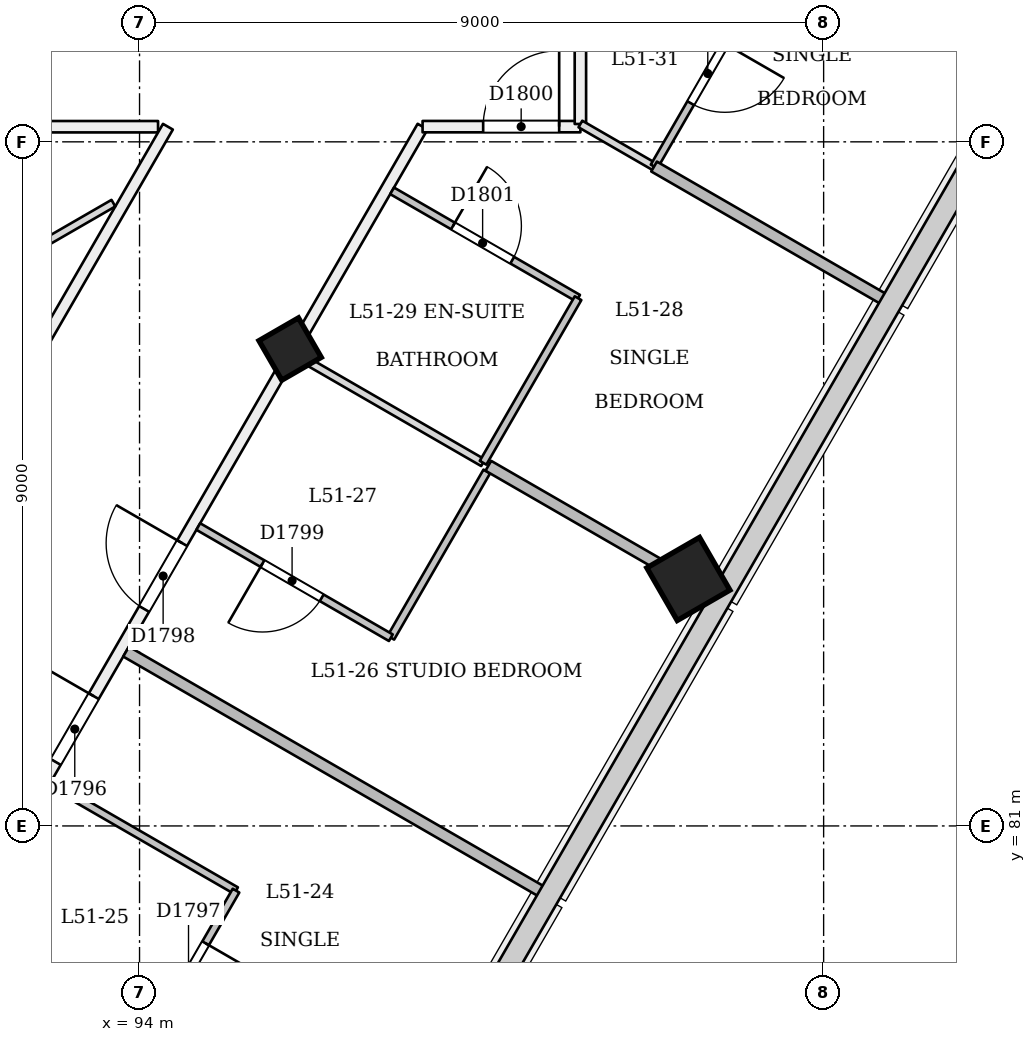
"""IFC4 building model, lengths in metres.
Left out: names, types, materials, properties, quantities, classifications, styles, units other than length and angle.
Written with IfcOpenShell. Run it as: python <this file> out.ifc"""

import sys

from ifc_helpers import new_model, si_unit, direction, frame, frame_2d, origin, origin_2d, place, context, subcontext, project, spatial, rectangle, extrude, element, fill, save


model = new_model("IFC4")
c1 = context("Model", 3, precision=1e-05, world=origin(), true_north=direction((0.0, 1.0)))
c2 = subcontext(c1, "Body", "Model", "MODEL_VIEW")
j1 = project(units=[si_unit("LENGTHUNIT", "METRE"), si_unit("PLANEANGLEUNIT", "RADIAN")], contexts=[c1])
p1 = place(None, origin())
s1 = spatial("IfcSite", under=j1, at=p1, CompositionType="ELEMENT")
p2 = place(p1, origin())
s2 = spatial("IfcBuilding", under=s1, at=p2, CompositionType="ELEMENT")
p3 = place(p2, frame((0.0, 0.0, 198.0)))
s3 = spatial("IfcBuildingStorey", under=s2, at=p3, CompositionType="ELEMENT", Elevation=198.0)
p4 = place(p3, frame((96.008, 87.227, -0.018), z_axis=(-0.02222134892, 0.038480872521, 0.999012229206), x_axis=(-0.500169939593, -0.865642180581, 0.022218162104)))
e1 = element("IfcColumn", 1, at=p4, inside=s3, PredefinedType="COLUMN", context=c2, shape_type="SweptSolid", body=[
    extrude(rectangle(XDim=0.6, YDim=0.6, at=origin_2d()), origin(), (0.0, 0.0, 1.0), 3.604),
])
p5 = place(p3, frame((101.248, 84.202, -0.024), z_axis=(-0.02215519141, 0.038415882353, 0.999016199807), x_axis=(-0.50065279292, -0.865364153162, 0.02217348332)))
e2 = element("IfcColumn", 2, at=p5, inside=s3, PredefinedType="COLUMN", context=c2, shape_type="SweptSolid", body=[
    extrude(rectangle(XDim=0.8, YDim=0.8, at=origin_2d()), origin(), (0.0, 0.0, 1.0), 3.604),
])
p6 = place(p3, frame((88.0, 90.199, 0.0), z_axis=(0.0, 0.0, 1.0), x_axis=(1.0, 0.0, 0.0)))
e3 = element("IfcWall", 3, at=p6, inside=s3, PredefinedType="PARTITIONING", context=c2, shape_type="SweptSolid", body=[
    extrude(rectangle(XDim=6.243, YDim=0.15, at=frame_2d((3.122, 0.0))), origin(), (0.0, 0.0, 1.0), 3.15),
])
p7 = place(p6, frame((1.845, 0.0, 0.0)))
e4 = element("IfcOpeningElement", 4, at=p7, cuts=e3, PredefinedType="OPENING", context=c2, shape_type="SweptSolid", body=[
    extrude(rectangle(XDim=1.0, YDim=2.1, at=frame_2d((0.5, 1.05))), frame((0.0, 0.085, 0.0), z_axis=(0.0, -1.0, 0.0), x_axis=(1.0, 0.0, 0.0)), (0.0, 0.0, 1.0), 0.171),
])
p8 = place(p3, frame((85.758, 69.475, 0.0), z_axis=(0.0, 0.0, 1.0), x_axis=(0.500001211172, 0.866024704513, 0.0)))
e5 = element("IfcWall", 5, at=p8, inside=s3, PredefinedType="PARTITIONING", context=c2, shape_type="SweptSolid", body=[
    extrude(rectangle(XDim=23.932, YDim=0.15, at=frame_2d((11.966, 0.0))), origin(), (0.0, 0.0, 1.0), 2.75),
])
p9 = place(p8, frame((5.395, 0.0, 0.0)))
e6 = element("IfcOpeningElement", 6, at=p9, cuts=e5, PredefinedType="OPENING", context=c2, shape_type="SweptSolid", body=[
    extrude(rectangle(XDim=1.0, YDim=2.1, at=frame_2d((0.5, 1.05))), frame((0.0, 0.085, 0.0), z_axis=(0.0, -1.0, 0.0), x_axis=(1.0, 0.0, 0.0)), (0.0, 0.0, 1.0), 0.171),
])
p10 = place(p8, frame((7.72, 0.0, 0.0)))
e7 = element("IfcOpeningElement", 7, at=p10, cuts=e5, PredefinedType="OPENING", context=c2, shape_type="SweptSolid", body=[
    extrude(rectangle(XDim=1.0, YDim=2.1, at=frame_2d((0.5, 1.05))), frame((0.0, 0.085, 0.0), z_axis=(0.0, -1.0, 0.0), x_axis=(1.0, 0.0, 0.0)), (0.0, 0.0, 1.0), 0.171),
])
p11 = place(p8, frame((14.28, 0.0, 0.0)))
e8 = element("IfcOpeningElement", 8, at=p11, cuts=e5, PredefinedType="OPENING", context=c2, shape_type="SweptSolid", body=[
    extrude(rectangle(XDim=1.0, YDim=2.1, at=frame_2d((0.5, 1.05))), frame((0.0, 0.085, 0.0), z_axis=(0.0, -1.0, 0.0), x_axis=(1.0, 0.0, 0.0)), (0.0, 0.0, 1.0), 0.171),
])
p12 = place(p8, frame((16.605, 0.0, 0.0)))
e9 = element("IfcOpeningElement", 9, at=p12, cuts=e5, PredefinedType="OPENING", context=c2, shape_type="SweptSolid", body=[
    extrude(rectangle(XDim=1.0, YDim=2.1, at=frame_2d((0.5, 1.05))), frame((0.0, 0.085, 0.0), z_axis=(0.0, -1.0, 0.0), x_axis=(1.0, 0.0, 0.0)), (0.0, 0.0, 1.0), 0.171),
])
p13 = place(p3, frame((97.724, 90.2, 0.0), z_axis=(0.0, 0.0, 1.0), x_axis=(1.0, 0.0, 0.0)))
e10 = element("IfcWall", 10, at=p13, inside=s3, PredefinedType="PARTITIONING", context=c2, shape_type="SweptSolid", body=[
    extrude(rectangle(XDim=2.076, YDim=0.15, at=frame_2d((1.038, 0.0))), origin(), (0.0, 0.0, 1.0), 3.15),
])
p14 = place(p13, frame((0.797, 0.0, 0.0)))
e11 = element("IfcOpeningElement", 11, at=p14, cuts=e10, PredefinedType="OPENING", context=c2, shape_type="SweptSolid", body=[
    extrude(rectangle(XDim=1.0, YDim=2.1, at=frame_2d((0.5, 1.05))), frame((0.0, 0.085, 0.0), z_axis=(0.0, -1.0, 0.0), x_axis=(1.0, 0.0, 0.0)), (0.0, 0.0, 1.0), 0.171),
])
p15 = place(p3, frame((99.8, 90.235, 0.0), z_axis=(0.0, 0.0, 1.0), x_axis=(0.0, 1.0, 0.0)))
e12 = element("IfcWall", 12, at=p15, inside=s3, PredefinedType="PARTITIONING", context=c2, shape_type="SweptSolid", body=[
    extrude(rectangle(XDim=3.561, YDim=0.15, at=frame_2d((1.781, 0.0))), origin(), (0.0, 0.0, 1.0), 3.15),
])
p16 = place(p3, frame((94.373, 90.199, 0.0), z_axis=(0.0, 0.0, 1.0), x_axis=(-0.499999438619, -0.866025727897, 0.0)))
e13 = element("IfcWall", 13, at=p16, inside=s3, PredefinedType="PARTITIONING", context=c2, shape_type="SweptSolid", body=[
    extrude(rectangle(XDim=18.617, YDim=0.15, at=frame_2d((9.308, 0.0))), origin(), (0.0, 0.0, 1.0), 3.15),
])
p17 = place(p16, frame((5.282, 0.0, 0.0)))
e14 = element("IfcOpeningElement", 14, at=p17, cuts=e13, PredefinedType="OPENING", context=c2, shape_type="SweptSolid", body=[
    extrude(rectangle(XDim=0.9, YDim=2.1, at=frame_2d((0.45, 1.05))), frame((0.0, 0.085, 0.0), z_axis=(0.0, -1.0, 0.0), x_axis=(1.0, 0.0, 0.0)), (0.0, 0.0, 1.0), 0.171),
])
p18 = place(p3, frame((93.656, 89.193, 0.0), z_axis=(0.0, 0.0, 1.0), x_axis=(-0.866016884399, -0.500014755718, 0.0)))
e15 = element("IfcWall", 15, at=p18, inside=s3, PredefinedType="PARTITIONING", context=c2, shape_type="SweptSolid", body=[
    extrude(rectangle(XDim=6.531, YDim=0.1, at=frame_2d((3.266, 0.0))), origin(), (0.0, 0.0, 1.0), 3.15),
])
p19 = place(p3, frame((93.976, 78.009, 0.0), z_axis=(0.0, 0.0, 1.0), x_axis=(-0.866042014628, 0.499971228071, 0.0)))
e16 = element("IfcWall", 16, at=p19, inside=s3, PredefinedType="PARTITIONING", context=c2, shape_type="SweptSolid", body=[
    extrude(rectangle(XDim=2.775, YDim=0.1, at=frame_2d((1.388, 0.0))), origin(), (0.0, 0.0, 1.0), 2.75),
])
p20 = place(p3, frame((92.823, 81.561, 0.0), z_axis=(0.0, 0.0, 1.0), x_axis=(0.866048868473, -0.499959355765, 0.0)))
e17 = element("IfcWall", 17, at=p20, inside=s3, PredefinedType="PARTITIONING", context=c2, shape_type="SweptSolid", body=[
    extrude(rectangle(XDim=2.825, YDim=0.1, at=frame_2d((1.413, 0.0))), origin(), (0.0, 0.0, 1.0), 3.15),
])
p21 = place(p3, frame((95.269, 80.149, 0.0), z_axis=(0.0, 0.0, 1.0), x_axis=(-0.500004234368, -0.866022959057, 0.0)))
e18 = element("IfcWall", 18, at=p21, inside=s3, PredefinedType="PARTITIONING", context=c2, shape_type="SweptSolid", body=[
    extrude(rectangle(XDim=5.0, YDim=0.1, at=frame_2d((2.5, 0.0))), origin(), (0.0, 0.0, 1.0), 2.75),
])
p22 = place(p21, frame((3.3, 0.0, 0.0)))
e19 = element("IfcOpeningElement", 19, at=p22, cuts=e18, PredefinedType="OPENING", context=c2, shape_type="SweptSolid", body=[
    extrude(rectangle(XDim=0.9, YDim=2.1, at=frame_2d((0.45, 1.05))), frame((0.0, 0.061, 0.0), z_axis=(0.0, -1.0, 0.0), x_axis=(1.0, 0.0, 0.0)), (0.0, 0.0, 1.0), 0.121),
])
p23 = place(p21, frame((0.8, 0.0, 0.0)))
e20 = element("IfcOpeningElement", 20, at=p23, cuts=e18, PredefinedType="OPENING", context=c2, shape_type="SweptSolid", body=[
    extrude(rectangle(XDim=0.9, YDim=2.1, at=frame_2d((0.45, 1.05))), frame((0.0, 0.061, 0.0), z_axis=(0.0, -1.0, 0.0), x_axis=(1.0, 0.0, 0.0)), (0.0, 0.0, 1.0), 0.121),
])
p24 = place(p3, frame((99.318, 80.121, 0.0), z_axis=(0.0, 0.0, 1.0), x_axis=(-0.866025401434, 0.500000004071, 0.0)))
e21 = element("IfcWall", 21, at=p24, inside=s3, PredefinedType="PARTITIONING", context=c2, shape_type="SweptSolid", body=[
    extrude(rectangle(XDim=6.345, YDim=0.15, at=frame_2d((3.173, 0.0))), origin(), (0.0, 0.0, 1.0), 2.65),
])
p25 = place(p3, frame((98.568, 85.663, 0.0), z_axis=(0.0, 0.0, 1.0), x_axis=(-0.499976333282, -0.866039067339, 0.0)))
e22 = element("IfcWall", 22, at=p25, inside=s3, PredefinedType="PARTITIONING", context=c2, shape_type="SweptSolid", body=[
    extrude(rectangle(XDim=2.525, YDim=0.1, at=frame_2d((1.262, 0.0))), origin(), (0.0, 0.0, 1.0), 2.75),
])
p26 = place(p3, frame((97.306, 83.476, 0.0), z_axis=(0.0, 0.0, 1.0), x_axis=(-0.86601045545, 0.500025890382, 0.0)))
e23 = element("IfcWall", 23, at=p26, inside=s3, PredefinedType="PARTITIONING", context=c2, shape_type="SweptSolid", body=[
    extrude(rectangle(XDim=2.925, YDim=0.1, at=frame_2d((1.462, 0.0))), origin(), (0.0, 0.0, 1.0), 3.15),
])
p27 = place(p26, frame((1.05, 0.0, 0.0)))
e24 = element("IfcOpeningElement", 24, at=p27, cuts=e23, PredefinedType="OPENING", context=c2, shape_type="SweptSolid", body=[
    extrude(rectangle(XDim=0.9, YDim=2.1, at=frame_2d((0.45, 1.05))), frame((0.0, 0.061, 0.0), z_axis=(0.0, -1.0, 0.0), x_axis=(1.0, 0.0, 0.0)), (0.0, 0.0, 1.0), 0.121),
])
p28 = place(p3, frame((101.551, 84.028, 0.0), z_axis=(0.0, 0.0, 1.0), x_axis=(-0.866038183914, 0.499977863513, 0.0)))
e25 = element("IfcWall", 25, at=p28, inside=s3, PredefinedType="PARTITIONING", context=c2, shape_type="SweptSolid", body=[
    extrude(rectangle(XDim=3.42, YDim=0.15, at=frame_2d((1.71, 0.0))), origin(), (0.0, 0.0, 1.0), 2.65),
])
p29 = place(p3, frame((98.519, 85.778, 0.0), z_axis=(0.0, 0.0, 1.0), x_axis=(-0.866011447264, 0.500024172624, 0.0)))
e26 = element("IfcWall", 26, at=p29, inside=s3, PredefinedType="PARTITIONING", context=c2, shape_type="SweptSolid", body=[
    extrude(rectangle(XDim=2.825, YDim=0.1, at=frame_2d((1.413, 0.0))), origin(), (0.0, 0.0, 1.0), 2.75),
])
p30 = place(p3, frame((97.323, 89.356, 0.0), z_axis=(0.0, 0.0, 1.0), x_axis=(0.866011447264, -0.500024172624, 0.0)))
e27 = element("IfcWall", 27, at=p30, inside=s3, PredefinedType="PARTITIONING", context=c2, shape_type="SweptSolid", body=[
    extrude(rectangle(XDim=2.825, YDim=0.1, at=frame_2d((1.413, 0.0))), origin(), (0.0, 0.0, 1.0), 3.15),
])
p31 = place(p30, frame((0.925, 0.0, 0.0)))
e28 = element("IfcOpeningElement", 28, at=p31, cuts=e27, PredefinedType="OPENING", context=c2, shape_type="SweptSolid", body=[
    extrude(rectangle(XDim=0.9, YDim=2.1, at=frame_2d((0.45, 1.05))), frame((0.0, 0.061, 0.0), z_axis=(0.0, -1.0, 0.0), x_axis=(1.0, 0.0, 0.0)), (0.0, 0.0, 1.0), 0.121),
])
p32 = place(p3, frame((99.769, 87.943, 0.0), z_axis=(0.0, 0.0, 1.0), x_axis=(-0.500004234368, -0.866022959057, 0.0)))
e29 = element("IfcWall", 29, at=p32, inside=s3, PredefinedType="PARTITIONING", context=c2, shape_type="SweptSolid", body=[
    extrude(rectangle(XDim=2.5, YDim=0.1, at=frame_2d((1.25, 0.0))), origin(), (0.0, 0.0, 1.0), 2.75),
])
p33 = place(p3, frame((103.818, 87.915, 0.0), z_axis=(0.0, 0.0, 1.0), x_axis=(-0.866036599697, 0.499980607609, 0.0)))
e30 = element("IfcWall", 30, at=p33, inside=s3, PredefinedType="PARTITIONING", context=c2, shape_type="SweptSolid", body=[
    extrude(rectangle(XDim=3.52, YDim=0.15, at=frame_2d((1.76, 0.0))), origin(), (0.0, 0.0, 1.0), 2.65),
])
p34 = place(p3, frame((100.769, 89.675, 0.0), z_axis=(0.0, 0.0, 1.0), x_axis=(-0.865938551386, 0.500150402602, 0.0)))
e31 = element("IfcWall", 31, at=p34, inside=s3, PredefinedType="PARTITIONING", context=c2, shape_type="SweptSolid", body=[
    extrude(rectangle(XDim=1.119, YDim=0.1, at=frame_2d((0.56, 0.0))), origin(), (0.0, 0.0, 1.0), 3.15),
])
p35 = place(p3, frame((102.019, 91.84, 0.0), z_axis=(0.0, 0.0, 1.0), x_axis=(-0.499961950354, -0.866047370643, 0.0)))
e32 = element("IfcWall", 32, at=p35, inside=s3, PredefinedType="PARTITIONING", context=c2, shape_type="SweptSolid", body=[
    extrude(rectangle(XDim=2.5, YDim=0.1, at=frame_2d((1.25, 0.0))), origin(), (0.0, 0.0, 1.0), 3.15),
])
p36 = place(p35, frame((0.637, 0.0, 0.0)))
e33 = element("IfcOpeningElement", 33, at=p36, cuts=e32, PredefinedType="OPENING", context=c2, shape_type="SweptSolid", body=[
    extrude(rectangle(XDim=0.9, YDim=2.1, at=frame_2d((0.45, 1.05))), frame((0.0, 0.061, 0.0), z_axis=(0.0, -1.0, 0.0), x_axis=(1.0, 0.0, 0.0)), (0.0, 0.0, 1.0), 0.121),
])
p37 = place(p11, origin())
e34 = element("IfcDoor", 34, at=p37, inside=s3, OperationType="SINGLE_SWING_RIGHT", PredefinedType="NOTDEFINED", context=c2, shape_type="SweptSolid", body=[
    extrude(rectangle(XDim=1.0, YDim=2.1, at=frame_2d((0.5, 1.05))), frame((0.0, 0.025, 0.0), z_axis=(0.0, -1.0, 0.0), x_axis=(1.0, 0.0, 0.0)), (0.0, 0.0, 1.0), 0.05),
])
fill(e8, e34)
p38 = place(p23, origin())
e35 = element("IfcDoor", 35, at=p38, inside=s3, OperationType="SINGLE_SWING_LEFT", PredefinedType="NOTDEFINED", context=c2, shape_type="SweptSolid", body=[
    extrude(rectangle(XDim=0.9, YDim=2.1, at=frame_2d((0.45, 1.05))), frame((0.0, 0.025, 0.0), z_axis=(0.0, -1.0, 0.0), x_axis=(1.0, 0.0, 0.0)), (0.0, 0.0, 1.0), 0.05),
])
fill(e20, e35)
p39 = place(p12, origin())
e36 = element("IfcDoor", 36, at=p39, inside=s3, OperationType="SINGLE_SWING_RIGHT", PredefinedType="NOTDEFINED", context=c2, shape_type="SweptSolid", body=[
    extrude(rectangle(XDim=1.0, YDim=2.1, at=frame_2d((0.5, 1.05))), frame((0.0, 0.025, 0.0), z_axis=(0.0, -1.0, 0.0), x_axis=(1.0, 0.0, 0.0)), (0.0, 0.0, 1.0), 0.05),
])
fill(e9, e36)
p40 = place(p27, origin())
e37 = element("IfcDoor", 37, at=p40, inside=s3, OperationType="SINGLE_SWING_RIGHT", PredefinedType="NOTDEFINED", context=c2, shape_type="SweptSolid", body=[
    extrude(rectangle(XDim=0.9, YDim=2.1, at=frame_2d((0.45, 1.05))), frame((0.0, 0.025, 0.0), z_axis=(0.0, -1.0, 0.0), x_axis=(1.0, 0.0, 0.0)), (0.0, 0.0, 1.0), 0.05),
])
fill(e24, e37)
p41 = place(p14, origin())
e38 = element("IfcDoor", 38, at=p41, inside=s3, OperationType="SINGLE_SWING_RIGHT", PredefinedType="NOTDEFINED", context=c2, shape_type="SweptSolid", body=[
    extrude(rectangle(XDim=1.0, YDim=2.1, at=frame_2d((0.5, 1.05))), frame((0.0, 0.025, 0.0), z_axis=(0.0, -1.0, 0.0), x_axis=(1.0, 0.0, 0.0)), (0.0, 0.0, 1.0), 0.05),
])
fill(e11, e38)
p42 = place(p31, origin())
e39 = element("IfcDoor", 39, at=p42, inside=s3, OperationType="SINGLE_SWING_LEFT", PredefinedType="NOTDEFINED", context=c2, shape_type="SweptSolid", body=[
    extrude(rectangle(XDim=0.9, YDim=2.1, at=frame_2d((0.45, 1.05))), frame((0.0, 0.025, 0.0), z_axis=(0.0, -1.0, 0.0), x_axis=(1.0, 0.0, 0.0)), (0.0, 0.0, 1.0), 0.05),
])
fill(e28, e39)
p43 = place(p36, origin())
e40 = element("IfcDoor", 40, at=p43, inside=s3, OperationType="SINGLE_SWING_LEFT", PredefinedType="NOTDEFINED", context=c2, shape_type="SweptSolid", body=[
    extrude(rectangle(XDim=0.9, YDim=2.1, at=frame_2d((0.45, 1.05))), frame((0.0, 0.025, 0.0), z_axis=(0.0, -1.0, 0.0), x_axis=(1.0, 0.0, 0.0)), (0.0, 0.0, 1.0), 0.05),
])
fill(e33, e40)
save(model, sys.argv[1])
